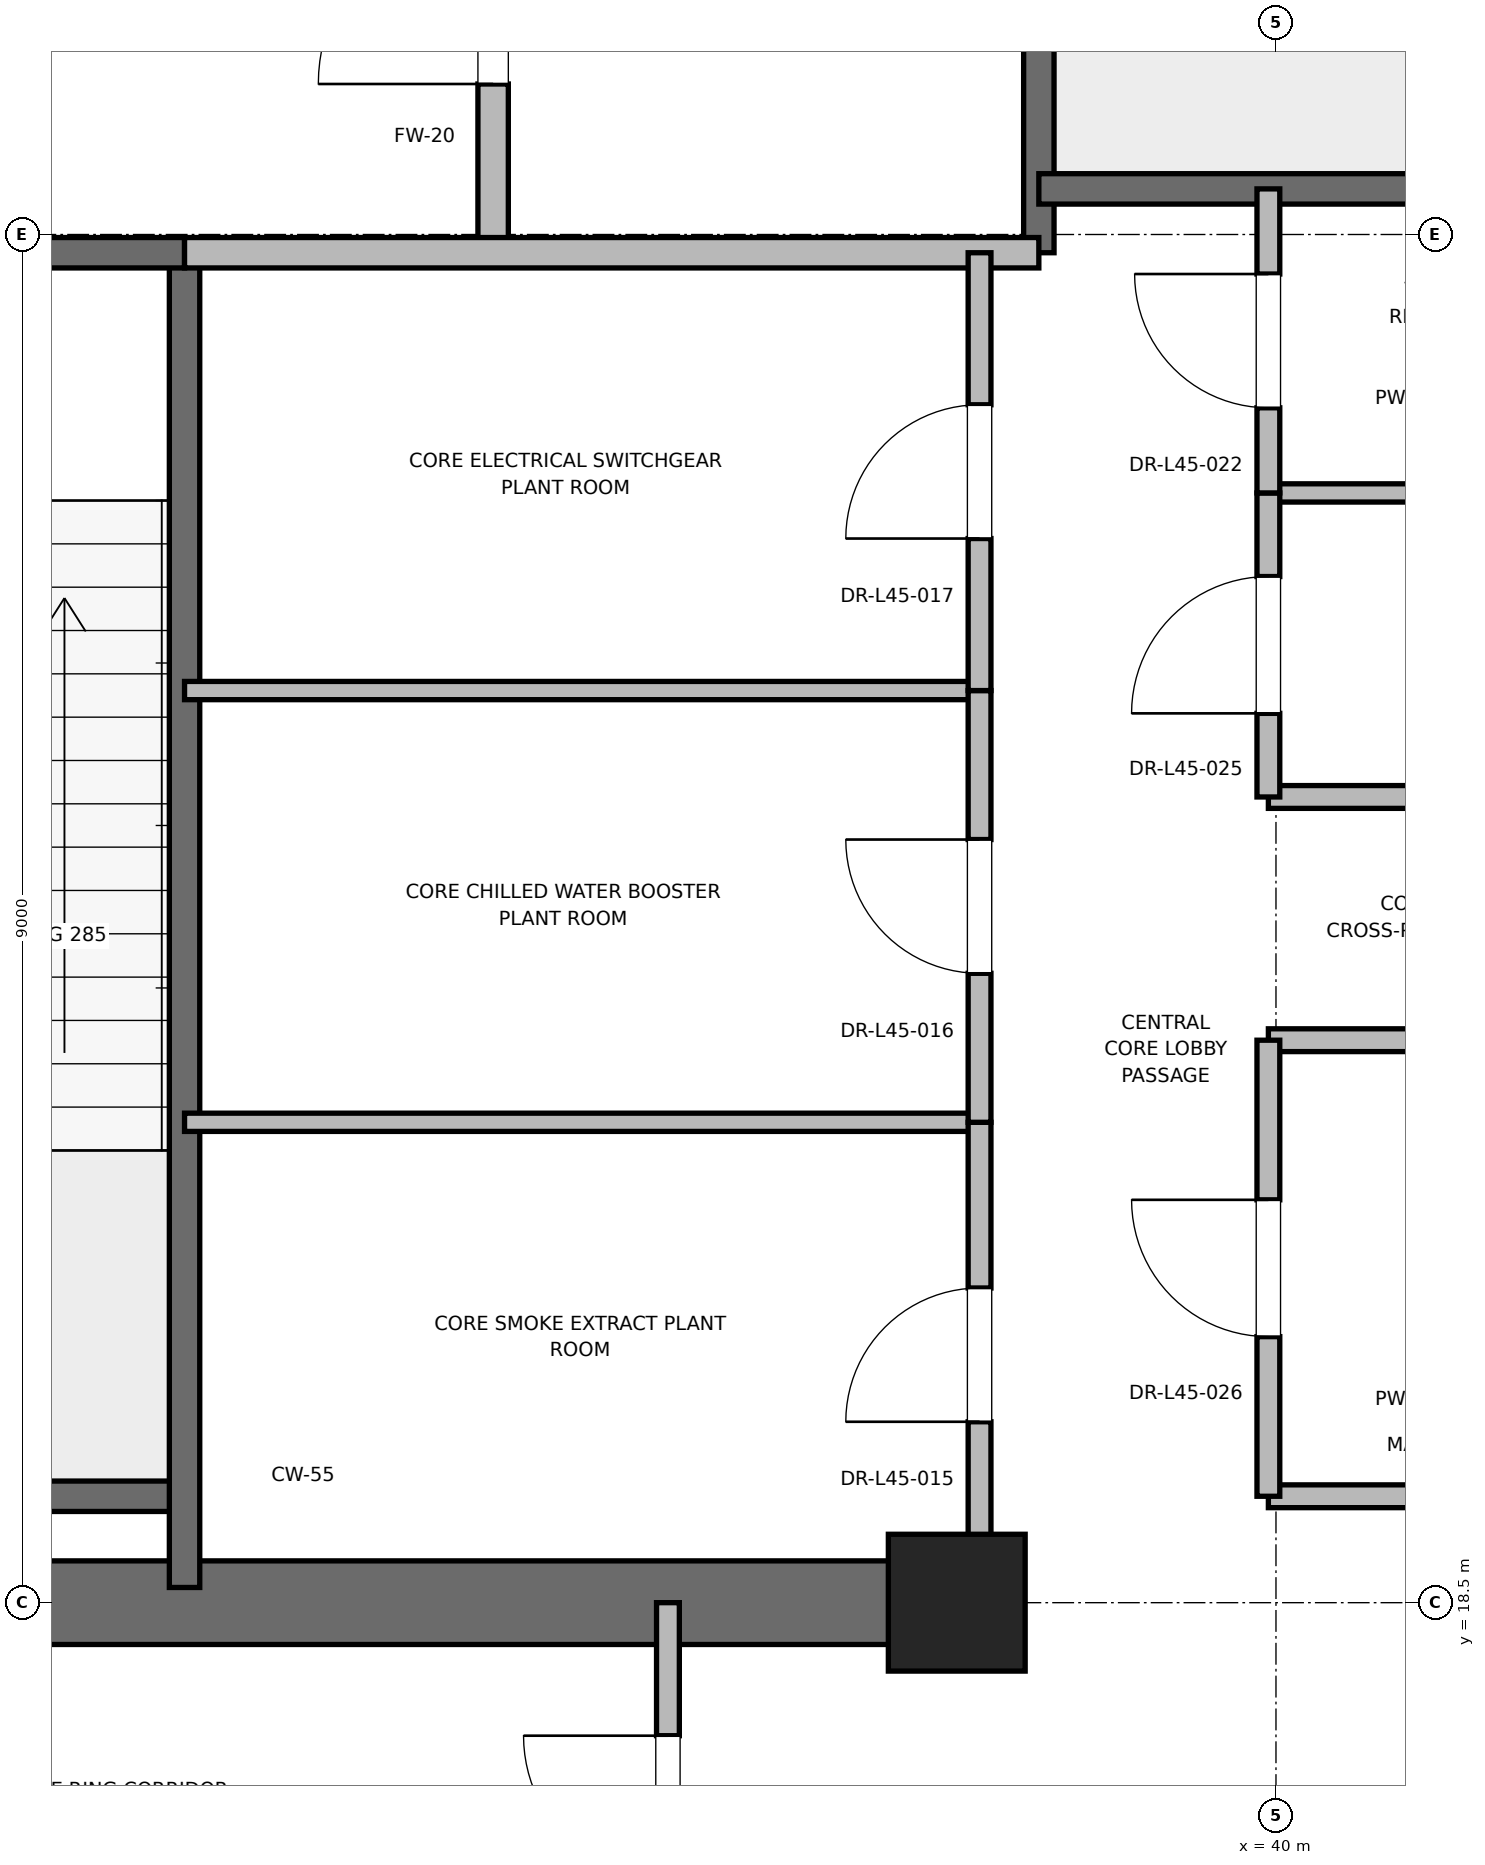
"""IFC4 building model, lengths in metres.
Left out: names, types, materials, properties, quantities, classifications, styles, units other than length and angle.
Written with IfcOpenShell. Run it as: python <this file> out.ifc"""

import sys

from ifc_helpers import new_model, si_unit, direction, frame, frame_2d, origin, origin_2d, place, context, subcontext, project, spatial, rectangle, extrude, element, fill, save


model = new_model("IFC4")
c1 = context("Model", 3, precision=1e-05, world=origin(), true_north=direction((0.0, 1.0)))
c2 = subcontext(c1, "Body", "Model", "MODEL_VIEW")
j1 = project(units=[si_unit("LENGTHUNIT", "METRE"), si_unit("PLANEANGLEUNIT", "RADIAN")], contexts=[c1])
p1 = place(None, origin())
s1 = spatial("IfcSite", under=j1, at=p1, CompositionType="ELEMENT")
p2 = place(p1, origin())
s2 = spatial("IfcBuilding", under=s1, at=p2, CompositionType="ELEMENT")
p3 = place(p2, frame((0.0, 0.0, 194.8)))
s3 = spatial("IfcBuildingStorey", under=s2, at=p3, CompositionType="ELEMENT", Elevation=194.8)
p4 = place(p3, frame((37.9, 18.5, 0.0), z_axis=(0.0, 0.0, 1.0), x_axis=(1.0, 0.0, 0.0)))
e1 = element("IfcColumn", 1, at=p4, inside=s3, PredefinedType="PILASTER", context=c2, shape_type="SweptSolid", body=[
    extrude(rectangle(XDim=0.9, YDim=0.9, at=origin_2d()), origin(), (0.0, 0.0, 1.0), 5.4),
])
p5 = place(p3, frame((29.0, 18.5, 0.0), z_axis=(0.0, 0.0, 1.0), x_axis=(1.0, 0.0, 0.0)))
e2 = element("IfcWall", 2, at=p5, inside=s3, PredefinedType="SHEAR", context=c2, shape_type="SweptSolid", body=[
    extrude(rectangle(XDim=9.2, YDim=0.55, at=frame_2d((4.6, 0.0))), origin(), (0.0, 0.0, 1.0), 5.1),
])
p6 = place(p3, frame((29.7, 19.2, 0.0), z_axis=(0.0, 0.0, 1.0), x_axis=(1.0, 0.0, 0.0)))
e3 = element("IfcWall", 3, at=p6, inside=s3, PredefinedType="SOLIDWALL", context=c2, shape_type="SweptSolid", body=[
    extrude(rectangle(XDim=3.12, YDim=0.2, at=frame_2d((1.56, 0.0))), origin(), (0.0, 0.0, 1.0), 5.1),
])
p7 = place(p3, frame((32.82, 18.6, 0.0), z_axis=(0.0, 0.0, 1.0), x_axis=(0.0, 1.0, 0.0)))
e4 = element("IfcWall", 4, at=p7, inside=s3, PredefinedType="SOLIDWALL", context=c2, shape_type="SweptSolid", body=[
    extrude(rectangle(XDim=8.78, YDim=0.2, at=frame_2d((4.39, 0.0))), origin(), (0.0, 0.0, 1.0), 5.1),
])
p8 = place(p3, frame((29.7, 27.38, 0.0), z_axis=(0.0, 0.0, 1.0), x_axis=(1.0, 0.0, 0.0)))
e5 = element("IfcWall", 5, at=p8, inside=s3, PredefinedType="SOLIDWALL", context=c2, shape_type="SweptSolid", body=[
    extrude(rectangle(XDim=3.12, YDim=0.2, at=frame_2d((1.56, 0.0))), origin(), (0.0, 0.0, 1.0), 5.1),
])
p9 = place(p8, frame((1.01, 0.0, 0.0)))
e6 = element("IfcOpeningElement", 6, at=p9, cuts=e5, PredefinedType="OPENING", context=c2, shape_type="SweptSolid", body=[
    extrude(rectangle(XDim=1.1, YDim=2.15, at=frame_2d((0.55, 1.075))), frame((0.0, 0.1, 0.0), z_axis=(0.0, -1.0, 0.0), x_axis=(1.0, 0.0, 0.0)), (0.0, 0.0, 1.0), 0.2),
])
p10 = place(p3, frame((38.44, 27.38, 0.0), z_axis=(0.0, 0.0, 1.0), x_axis=(0.0, 1.0, 0.0)))
e7 = element("IfcWall", 7, at=p10, inside=s3, PredefinedType="SOLIDWALL", context=c2, shape_type="SweptSolid", body=[
    extrude(rectangle(XDim=8.87, YDim=0.2, at=frame_2d((4.435, 0.0))), origin(), (0.0, 0.0, 1.0), 5.1),
])
p11 = place(p3, frame((38.44, 27.8, 0.0), z_axis=(0.0, 0.0, 1.0), x_axis=(1.0, 0.0, 0.0)))
e8 = element("IfcWall", 8, at=p11, inside=s3, PredefinedType="SOLIDWALL", context=c2, shape_type="SweptSolid", body=[
    extrude(rectangle(XDim=3.32, YDim=0.2, at=frame_2d((1.66, 0.0))), origin(), (0.0, 0.0, 1.0), 5.1),
])
p12 = place(p3, frame((34.85, 27.38, 0.0), z_axis=(0.0, 0.0, 1.0), x_axis=(0.0, 1.0, 0.0)))
e9 = element("IfcWall", 9, at=p12, inside=s3, PredefinedType="PARTITIONING", context=c2, shape_type="SweptSolid", body=[
    extrude(rectangle(XDim=3.37, YDim=0.2, at=frame_2d((1.685, 0.0))), origin(), (0.0, 0.0, 1.0), 5.1),
])
p13 = place(p12, frame((1.11, 0.0, 0.0)))
e10 = element("IfcOpeningElement", 10, at=p13, cuts=e9, PredefinedType="OPENING", context=c2, shape_type="SweptSolid", body=[
    extrude(rectangle(XDim=1.15, YDim=2.2, at=frame_2d((0.575, 1.1))), frame((0.0, 0.1, 0.0), z_axis=(0.0, -1.0, 0.0), x_axis=(1.0, 0.0, 0.0)), (0.0, 0.0, 1.0), 0.2),
])
p14 = place(p3, frame((32.82, 27.38, 0.0), z_axis=(0.0, 0.0, 1.0), x_axis=(1.0, 0.0, 0.0)))
e11 = element("IfcWall", 11, at=p14, inside=s3, PredefinedType="PARTITIONING", context=c2, shape_type="SweptSolid", body=[
    extrude(rectangle(XDim=5.62, YDim=0.2, at=frame_2d((2.81, 0.0))), origin(), (0.0, 0.0, 1.0), 5.1),
])
for number, where, z_axis, x_axis in (
    (12, (39.95, 19.2, 0.0), (0.0, 0.0, 1.0), (1.0, 0.0, 0.0)),
    (13, (39.95, 22.2, 0.0), (0.0, 0.0, 1.0), (1.0, 0.0, 0.0)),
    (14, (39.95, 23.8, 0.0), (0.0, 0.0, 1.0), (1.0, 0.0, 0.0)),
):
    element("IfcWall", number, at=place(p3, frame(where, z_axis=z_axis, x_axis=x_axis)), inside=s3, PredefinedType="PARTITIONING", context=c2, shape_type="SweptSolid", body=[
        extrude(rectangle(XDim=1.81, YDim=0.15, at=frame_2d((0.905, 0.0))), origin(), (0.0, 0.0, 1.0), 2.85),
    ])
p15 = place(p3, frame((39.95, 25.8, 0.0), z_axis=(0.0, 0.0, 1.0), x_axis=(1.0, 0.0, 0.0)))
e15 = element("IfcWall", 15, at=p15, inside=s3, PredefinedType="PARTITIONING", context=c2, shape_type="SweptSolid", body=[
    extrude(rectangle(XDim=1.81, YDim=0.12, at=frame_2d((0.905, 0.0))), origin(), (0.0, 0.0, 1.0), 2.85),
])
p16 = place(p3, frame((39.95, 19.2, 0.0), z_axis=(0.0, 0.0, 1.0), x_axis=(0.0, 1.0, 0.0)))
e16 = element("IfcWall", 16, at=p16, inside=s3, PredefinedType="PARTITIONING", context=c2, shape_type="SweptSolid", body=[
    extrude(rectangle(XDim=3.0, YDim=0.15, at=frame_2d((1.5, 0.0))), origin(), (0.0, 0.0, 1.0), 2.85),
])
p17 = place(p16, frame((1.05, 0.0, 0.0)))
e17 = element("IfcOpeningElement", 17, at=p17, cuts=e16, PredefinedType="OPENING", context=c2, shape_type="SweptSolid", body=[
    extrude(rectangle(XDim=0.9, YDim=2.1, at=frame_2d((0.45, 1.05))), frame((0.0, 0.075, 0.0), z_axis=(0.0, -1.0, 0.0), x_axis=(1.0, 0.0, 0.0)), (0.0, 0.0, 1.0), 0.15),
])
p18 = place(p3, frame((39.95, 23.8, 0.0), z_axis=(0.0, 0.0, 1.0), x_axis=(0.0, 1.0, 0.0)))
e18 = element("IfcWall", 18, at=p18, inside=s3, PredefinedType="PARTITIONING", context=c2, shape_type="SweptSolid", body=[
    extrude(rectangle(XDim=2.0, YDim=0.15, at=frame_2d((1.0, 0.0))), origin(), (0.0, 0.0, 1.0), 2.85),
])
p19 = place(p18, frame((0.55, 0.0, 0.0)))
e19 = element("IfcOpeningElement", 19, at=p19, cuts=e18, PredefinedType="OPENING", context=c2, shape_type="SweptSolid", body=[
    extrude(rectangle(XDim=0.9, YDim=2.1, at=frame_2d((0.45, 1.05))), frame((0.0, 0.075, 0.0), z_axis=(0.0, -1.0, 0.0), x_axis=(1.0, 0.0, 0.0)), (0.0, 0.0, 1.0), 0.15),
])
p20 = place(p3, frame((39.95, 25.8, 0.0), z_axis=(0.0, 0.0, 1.0), x_axis=(0.0, 1.0, 0.0)))
e20 = element("IfcWall", 20, at=p20, inside=s3, PredefinedType="PARTITIONING", context=c2, shape_type="SweptSolid", body=[
    extrude(rectangle(XDim=2.0, YDim=0.15, at=frame_2d((1.0, 0.0))), origin(), (0.0, 0.0, 1.0), 2.85),
])
p21 = place(p20, frame((0.56, 0.0, 0.0)))
e21 = element("IfcOpeningElement", 21, at=p21, cuts=e20, PredefinedType="OPENING", context=c2, shape_type="SweptSolid", body=[
    extrude(rectangle(XDim=0.88, YDim=2.1, at=frame_2d((0.44, 1.05))), frame((0.0, 0.075, 0.0), z_axis=(0.0, -1.0, 0.0), x_axis=(1.0, 0.0, 0.0)), (0.0, 0.0, 1.0), 0.15),
])
for number, where, z_axis, x_axis in (
    (22, (32.82, 21.66, 0.0), (0.0, 0.0, 1.0), (1.0, 0.0, 0.0)),
    (23, (32.82, 24.5, 0.0), (0.0, 0.0, 1.0), (1.0, 0.0, 0.0)),
):
    element("IfcWall", number, at=place(p3, frame(where, z_axis=z_axis, x_axis=x_axis)), inside=s3, PredefinedType="PARTITIONING", context=c2, shape_type="SweptSolid", body=[
        extrude(rectangle(XDim=5.23, YDim=0.12, at=frame_2d((2.615, 0.0))), origin(), (0.0, 0.0, 1.0), 2.85),
    ])
p22 = place(p3, frame((38.05, 18.6, 0.0), z_axis=(0.0, 0.0, 1.0), x_axis=(0.0, 1.0, 0.0)))
e24 = element("IfcWall", 24, at=p22, inside=s3, PredefinedType="PARTITIONING", context=c2, shape_type="SweptSolid", body=[
    extrude(rectangle(XDim=3.06, YDim=0.15, at=frame_2d((1.53, 0.0))), origin(), (0.0, 0.0, 1.0), 2.85),
])
p23 = place(p22, frame((1.09, 0.0, 0.0)))
e25 = element("IfcOpeningElement", 25, at=p23, cuts=e24, PredefinedType="OPENING", context=c2, shape_type="SweptSolid", body=[
    extrude(rectangle(XDim=0.88, YDim=2.1, at=frame_2d((0.44, 1.05))), frame((0.0, 0.075, 0.0), z_axis=(0.0, -1.0, 0.0), x_axis=(1.0, 0.0, 0.0)), (0.0, 0.0, 1.0), 0.15),
])
p24 = place(p3, frame((38.05, 21.66, 0.0), z_axis=(0.0, 0.0, 1.0), x_axis=(0.0, 1.0, 0.0)))
e26 = element("IfcWall", 26, at=p24, inside=s3, PredefinedType="PARTITIONING", context=c2, shape_type="SweptSolid", body=[
    extrude(rectangle(XDim=2.84, YDim=0.15, at=frame_2d((1.42, 0.0))), origin(), (0.0, 0.0, 1.0), 2.85),
])
p25 = place(p24, frame((0.98, 0.0, 0.0)))
e27 = element("IfcOpeningElement", 27, at=p25, cuts=e26, PredefinedType="OPENING", context=c2, shape_type="SweptSolid", body=[
    extrude(rectangle(XDim=0.88, YDim=2.1, at=frame_2d((0.44, 1.05))), frame((0.0, 0.075, 0.0), z_axis=(0.0, -1.0, 0.0), x_axis=(1.0, 0.0, 0.0)), (0.0, 0.0, 1.0), 0.15),
])
p26 = place(p3, frame((38.05, 24.5, 0.0), z_axis=(0.0, 0.0, 1.0), x_axis=(0.0, 1.0, 0.0)))
e28 = element("IfcWall", 28, at=p26, inside=s3, PredefinedType="PARTITIONING", context=c2, shape_type="SweptSolid", body=[
    extrude(rectangle(XDim=2.88, YDim=0.15, at=frame_2d((1.44, 0.0))), origin(), (0.0, 0.0, 1.0), 2.85),
])
p27 = place(p26, frame((1.0, 0.0, 0.0)))
e29 = element("IfcOpeningElement", 29, at=p27, cuts=e28, PredefinedType="OPENING", context=c2, shape_type="SweptSolid", body=[
    extrude(rectangle(XDim=0.88, YDim=2.1, at=frame_2d((0.44, 1.05))), frame((0.0, 0.075, 0.0), z_axis=(0.0, -1.0, 0.0), x_axis=(1.0, 0.0, 0.0)), (0.0, 0.0, 1.0), 0.15),
])
p28 = place(p3, frame((36.0, 15.8, 0.0), z_axis=(0.0, 0.0, 1.0), x_axis=(0.0, 1.0, 0.0)))
e30 = element("IfcWall", 30, at=p28, inside=s3, PredefinedType="PARTITIONING", context=c2, shape_type="SweptSolid", body=[
    extrude(rectangle(XDim=2.7, YDim=0.15, at=frame_2d((1.35, 0.0))), origin(), (0.0, 0.0, 1.0), 2.85),
])
p29 = place(p28, frame((0.875, 0.0, 0.0)))
e31 = element("IfcOpeningElement", 31, at=p29, cuts=e30, PredefinedType="OPENING", context=c2, shape_type="SweptSolid", body=[
    extrude(rectangle(XDim=0.95, YDim=2.15, at=frame_2d((0.475, 1.075))), frame((0.0, 0.075, 0.0), z_axis=(0.0, -1.0, 0.0), x_axis=(1.0, 0.0, 0.0)), (0.0, 0.0, 1.0), 0.15),
])
p30 = place(p13, origin())
e32 = element("IfcDoor", 32, at=p30, inside=s3, OperationType="SINGLE_SWING_LEFT", PredefinedType="DOOR", context=c2, shape_type="SweptSolid", body=[
    extrude(rectangle(XDim=1.15, YDim=2.2, at=frame_2d((0.575, 1.1))), frame((0.0, 0.025, 0.0), z_axis=(0.0, -1.0, 0.0), x_axis=(1.0, 0.0, 0.0)), (0.0, 0.0, 1.0), 0.05),
])
fill(e10, e32)
p31 = place(p17, origin())
e33 = element("IfcDoor", 33, at=p31, inside=s3, OperationType="SINGLE_SWING_RIGHT", PredefinedType="DOOR", context=c2, shape_type="SweptSolid", body=[
    extrude(rectangle(XDim=0.9, YDim=2.1, at=frame_2d((0.45, 1.05))), frame((0.0, 0.025, 0.0), z_axis=(0.0, -1.0, 0.0), x_axis=(1.0, 0.0, 0.0)), (0.0, 0.0, 1.0), 0.05),
])
fill(e17, e33)
p32 = place(p19, origin())
e34 = element("IfcDoor", 34, at=p32, inside=s3, OperationType="SINGLE_SWING_LEFT", PredefinedType="DOOR", context=c2, shape_type="SweptSolid", body=[
    extrude(rectangle(XDim=0.9, YDim=2.1, at=frame_2d((0.45, 1.05))), frame((0.0, 0.025, 0.0), z_axis=(0.0, -1.0, 0.0), x_axis=(1.0, 0.0, 0.0)), (0.0, 0.0, 1.0), 0.05),
])
fill(e19, e34)
p33 = place(p21, origin())
e35 = element("IfcDoor", 35, at=p33, inside=s3, OperationType="SINGLE_SWING_RIGHT", PredefinedType="DOOR", context=c2, shape_type="SweptSolid", body=[
    extrude(rectangle(XDim=0.88, YDim=2.1, at=frame_2d((0.44, 1.05))), frame((0.0, 0.025, 0.0), z_axis=(0.0, -1.0, 0.0), x_axis=(1.0, 0.0, 0.0)), (0.0, 0.0, 1.0), 0.05),
])
fill(e21, e35)
p34 = place(p23, origin())
e36 = element("IfcDoor", 36, at=p34, inside=s3, OperationType="SINGLE_SWING_LEFT", PredefinedType="DOOR", context=c2, shape_type="SweptSolid", body=[
    extrude(rectangle(XDim=0.88, YDim=2.1, at=frame_2d((0.44, 1.05))), frame((0.0, 0.025, 0.0), z_axis=(0.0, -1.0, 0.0), x_axis=(1.0, 0.0, 0.0)), (0.0, 0.0, 1.0), 0.05),
])
fill(e25, e36)
p35 = place(p25, origin())
e37 = element("IfcDoor", 37, at=p35, inside=s3, OperationType="SINGLE_SWING_RIGHT", PredefinedType="DOOR", context=c2, shape_type="SweptSolid", body=[
    extrude(rectangle(XDim=0.88, YDim=2.1, at=frame_2d((0.44, 1.05))), frame((0.0, 0.025, 0.0), z_axis=(0.0, -1.0, 0.0), x_axis=(1.0, 0.0, 0.0)), (0.0, 0.0, 1.0), 0.05),
])
fill(e27, e37)
p36 = place(p27, origin())
e38 = element("IfcDoor", 38, at=p36, inside=s3, OperationType="SINGLE_SWING_LEFT", PredefinedType="DOOR", context=c2, shape_type="SweptSolid", body=[
    extrude(rectangle(XDim=0.88, YDim=2.1, at=frame_2d((0.44, 1.05))), frame((0.0, 0.025, 0.0), z_axis=(0.0, -1.0, 0.0), x_axis=(1.0, 0.0, 0.0)), (0.0, 0.0, 1.0), 0.05),
])
fill(e29, e38)
p37 = place(p29, origin())
e39 = element("IfcDoor", 39, at=p37, inside=s3, OperationType="SINGLE_SWING_RIGHT", PredefinedType="DOOR", context=c2, shape_type="SweptSolid", body=[
    extrude(rectangle(XDim=0.95, YDim=2.15, at=frame_2d((0.475, 1.075))), frame((0.0, 0.025, 0.0), z_axis=(0.0, -1.0, 0.0), x_axis=(1.0, 0.0, 0.0)), (0.0, 0.0, 1.0), 0.05),
])
fill(e31, e39)
save(model, sys.argv[1])
